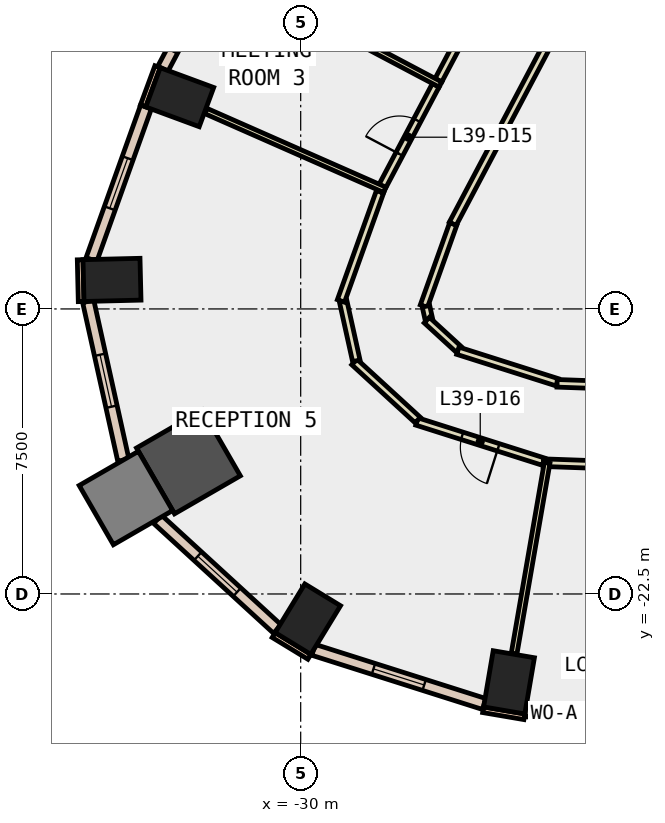
"""IFC4 building model, lengths in metres.
Left out: names, types, materials, properties, quantities, classifications, styles, units other than length and angle.
Written with IfcOpenShell. Run it as: python <this file> out.ifc"""

import sys

from ifc_helpers import new_model, si_unit, direction, frame, frame_2d, origin, origin_2d, place, context, subcontext, project, spatial, rectangle, extrude, element, fill, save


model = new_model("IFC4")
c1 = context("Model", 3, precision=1e-05, world=origin(), true_north=direction((0.0, 1.0)))
c2 = subcontext(c1, "Body", "Model", "MODEL_VIEW")
j1 = project(units=[si_unit("LENGTHUNIT", "METRE"), si_unit("PLANEANGLEUNIT", "RADIAN")], contexts=[c1])
p1 = place(None, origin())
s1 = spatial("IfcSite", under=j1, at=p1, CompositionType="ELEMENT")
p2 = place(p1, origin())
s2 = spatial("IfcBuilding", under=s1, at=p2, CompositionType="ELEMENT")
p3 = place(p2, frame((0.0, 0.0, 176.0)))
s3 = spatial("IfcBuildingStorey", under=s2, at=p3, CompositionType="ELEMENT", Elevation=176.0)
for number, where, z_axis, x_axis in (
    (1, (-24.518, -24.825, -0.4), (0.0, 0.0, 1.0), (-0.986, 0.168, 0.0)),
    (2, (-33.183, -9.429, -0.4), (0.0, 0.0, 1.0), (0.347, 0.938, 0.0)),
    (3, (-34.965, -14.236, -0.4), (0.0, 0.0, 1.0), (-0.024, 1.0, 0.0)),
):
    element("IfcColumn", number, at=place(p3, frame(where, z_axis=z_axis, x_axis=x_axis)), inside=s3, PredefinedType="COLUMN", context=c2, shape_type="SweptSolid", body=[
        extrude(rectangle(XDim=1.1, YDim=1.5, at=origin_2d()), origin(), (0.0, 0.0, 1.0), 4.2),
    ])
p4 = place(p3, frame((-32.954, -19.025, -0.4), z_axis=(0.0, 0.0, 1.0), x_axis=(0.866025403784, 0.5, 0.0)))
e4 = element("IfcColumn", 4, at=p4, inside=s3, PredefinedType="COLUMN", context=c2, shape_type="SweptSolid", body=[
    extrude(rectangle(XDim=2.0, YDim=2.0, at=origin_2d()), origin(), (0.0, 0.0, 1.0), 4.2),
])
p5 = place(p3, frame((-29.812, -23.163, -0.4), z_axis=(0.0, 0.0, 1.0), x_axis=(-0.853714435155, 0.520741455243, 0.0)))
e5 = element("IfcColumn", 5, at=p5, inside=s3, PredefinedType="COLUMN", context=c2, shape_type="SweptSolid", body=[
    extrude(rectangle(XDim=1.1, YDim=1.5, at=origin_2d()), origin(), (0.0, 0.0, 1.0), 4.2),
])
p6 = place(p3, frame((-34.599, -19.975, -0.4), z_axis=(0.0, 0.0, 1.0), x_axis=(0.866025403784, 0.5, 0.0)))
e6 = element("IfcColumn", 6, at=p6, inside=s3, PredefinedType="COLUMN", context=c2, shape_type="SweptSolid", body=[
    extrude(rectangle(XDim=1.8, YDim=1.8, at=origin_2d()), origin(), (0.0, 0.0, 1.0), 4.2),
])
p7 = place(p3, frame((-33.766, -8.627, 0.0), z_axis=(0.0, 0.0, 1.0), x_axis=(-0.346229846278, -0.938149718087, 0.0)))
e7 = element("IfcWall", 7, at=p7, inside=s3, PredefinedType="STANDARD", context=c2, shape_type="SweptSolid", body=[
    extrude(rectangle(XDim=1.1, YDim=0.15, at=frame_2d((0.55, 0.0))), origin(), (0.0, 0.0, 1.0), 3.8),
])
p8 = place(p3, frame((-25.199, -25.546, 0.0), z_axis=(0.0, 0.0, 1.0), x_axis=(0.985763338892, -0.168138751323, 0.0)))
e8 = element("IfcWall", 8, at=p8, inside=s3, PredefinedType="STANDARD", context=c2, shape_type="SweptSolid", body=[
    extrude(rectangle(XDim=1.101, YDim=0.15, at=frame_2d((0.55, 0.0))), origin(), (0.0, 0.0, 1.0), 3.8),
])
p9 = place(p3, frame((-35.803, -13.706, 0.0), z_axis=(0.0, 0.0, 1.0), x_axis=(0.023522901136, -0.999723298279, 0.0)))
e9 = element("IfcWall", 9, at=p9, inside=s3, PredefinedType="STANDARD", context=c2, shape_type="SweptSolid", body=[
    extrude(rectangle(XDim=1.1, YDim=0.15, at=frame_2d((0.55, 0.0))), origin(), (0.0, 0.0, 1.0), 3.8),
])
p10 = place(p3, frame((-30.711, -23.581, 0.0), z_axis=(0.0, 0.0, 1.0), x_axis=(0.854005542721, -0.520263907071, 0.0)))
e10 = element("IfcWall", 10, at=p10, inside=s3, PredefinedType="STANDARD", context=c2, shape_type="SweptSolid", body=[
    extrude(rectangle(XDim=1.099, YDim=0.15, at=frame_2d((0.55, 0.0))), origin(), (0.0, 0.0, 1.0), 3.8),
])
p11 = place(p3, frame((-24.09, -25.583, 0.0), z_axis=(0.0, 0.0, 1.0), x_axis=(0.999368368263, -0.035536805082, 0.0)))
e11 = element("IfcWall", 11, at=p11, inside=s3, PredefinedType="STANDARD", context=c2, shape_type="SweptSolid", body=[
    extrude(rectangle(XDim=7.317, YDim=0.3, at=frame_2d((3.658, 0.0))), origin(), (0.0, 0.0, 1.0), 3.8),
])
p12 = place(p11, frame((0.629, 0.0, 0.9)))
e12 = element("IfcOpeningElement", 12, at=p12, cuts=e11, PredefinedType="OPENING", context=c2, shape_type="SweptSolid", body=[
    extrude(rectangle(XDim=2.4, YDim=2.6, at=frame_2d((1.2, 1.3))), frame((0.0, 0.16, 0.0), z_axis=(0.0, -1.0, 0.0), x_axis=(1.0, 0.0, 0.0)), (0.0, 0.0, 1.0), 0.32),
])
p13 = place(p11, frame((4.287, 0.0, 0.9)))
e13 = element("IfcOpeningElement", 13, at=p13, cuts=e11, PredefinedType="OPENING", context=c2, shape_type="SweptSolid", body=[
    extrude(rectangle(XDim=2.4, YDim=2.6, at=frame_2d((1.2, 1.3))), frame((0.0, 0.16, 0.0), z_axis=(0.0, -1.0, 0.0), x_axis=(1.0, 0.0, 0.0)), (0.0, 0.0, 1.0), 0.32),
])
p14 = place(p3, frame((-30.765, -3.271, 0.0), z_axis=(0.0, 0.0, 1.0), x_axis=(-0.467572383403, -0.883954787463, 0.0)))
e14 = element("IfcWall", 14, at=p14, inside=s3, PredefinedType="STANDARD", context=c2, shape_type="SweptSolid", body=[
    extrude(rectangle(XDim=6.119, YDim=0.3, at=frame_2d((3.06, 0.0))), origin(), (0.0, 0.0, 1.0), 3.8),
])
p15 = place(p14, frame((0.53, 0.0, 0.9)))
e15 = element("IfcOpeningElement", 15, at=p15, cuts=e14, PredefinedType="OPENING", context=c2, shape_type="SweptSolid", body=[
    extrude(rectangle(XDim=2.0, YDim=2.6, at=frame_2d((1.0, 1.3))), frame((0.0, 0.16, 0.0), z_axis=(0.0, -1.0, 0.0), x_axis=(1.0, 0.0, 0.0)), (0.0, 0.0, 1.0), 0.32),
])
p16 = place(p14, frame((3.589, 0.0, 0.9)))
e16 = element("IfcOpeningElement", 16, at=p16, cuts=e14, PredefinedType="OPENING", context=c2, shape_type="SweptSolid", body=[
    extrude(rectangle(XDim=2.0, YDim=2.6, at=frame_2d((1.0, 1.3))), frame((0.0, 0.16, 0.0), z_axis=(0.0, -1.0, 0.0), x_axis=(1.0, 0.0, 0.0)), (0.0, 0.0, 1.0), 0.32),
])
p17 = place(p3, frame((-34.071, -9.686, 0.0), z_axis=(0.0, 0.0, 1.0), x_axis=(-0.336652028742, -0.941629126325, 0.0)))
e17 = element("IfcWall", 17, at=p17, inside=s3, PredefinedType="STANDARD", context=c2, shape_type="SweptSolid", body=[
    extrude(rectangle(XDim=4.263, YDim=0.3, at=frame_2d((2.131, 0.0))), origin(), (0.0, 0.0, 1.0), 3.8),
])
p18 = place(p17, frame((1.431, 0.0, 0.9)))
e18 = element("IfcOpeningElement", 18, at=p18, cuts=e17, PredefinedType="OPENING", context=c2, shape_type="SweptSolid", body=[
    extrude(rectangle(XDim=1.4, YDim=2.6, at=frame_2d((0.7, 1.3))), frame((0.0, 0.16, 0.0), z_axis=(0.0, -1.0, 0.0), x_axis=(1.0, 0.0, 0.0)), (0.0, 0.0, 1.0), 0.32),
])
p19 = place(p3, frame((-35.591, -14.801, 0.0), z_axis=(0.0, 0.0, 1.0), x_axis=(0.216102175589, -0.976370754225, 0.0)))
e19 = element("IfcWall", 19, at=p19, inside=s3, PredefinedType="STANDARD", context=c2, shape_type="SweptSolid", body=[
    extrude(rectangle(XDim=4.276, YDim=0.3, at=frame_2d((2.138, 0.0))), origin(), (0.0, 0.0, 1.0), 3.8),
])
p20 = place(p19, frame((1.438, 0.0, 0.9)))
e20 = element("IfcOpeningElement", 20, at=p20, cuts=e19, PredefinedType="OPENING", context=c2, shape_type="SweptSolid", body=[
    extrude(rectangle(XDim=1.4, YDim=2.6, at=frame_2d((0.7, 1.3))), frame((0.0, 0.16, 0.0), z_axis=(0.0, -1.0, 0.0), x_axis=(1.0, 0.0, 0.0)), (0.0, 0.0, 1.0), 0.32),
])
p21 = place(p3, frame((-33.768, -20.533, 0.0), z_axis=(0.0, 0.0, 1.0), x_axis=(0.737279680174, -0.675587650274, 0.0)))
e21 = element("IfcWall", 21, at=p21, inside=s3, PredefinedType="STANDARD", context=c2, shape_type="SweptSolid", body=[
    extrude(rectangle(XDim=4.278, YDim=0.3, at=frame_2d((2.139, 0.0))), origin(), (0.0, 0.0, 1.0), 3.8),
])
p22 = place(p21, frame((1.439, 0.0, 0.9)))
e22 = element("IfcOpeningElement", 22, at=p22, cuts=e21, PredefinedType="OPENING", context=c2, shape_type="SweptSolid", body=[
    extrude(rectangle(XDim=1.4, YDim=2.6, at=frame_2d((0.7, 1.3))), frame((0.0, 0.16, 0.0), z_axis=(0.0, -1.0, 0.0), x_axis=(1.0, 0.0, 0.0)), (0.0, 0.0, 1.0), 0.32),
])
p23 = place(p3, frame((-29.662, -23.97, 0.0), z_axis=(0.0, 0.0, 1.0), x_axis=(0.953145379857, -0.302512619337, 0.0)))
e23 = element("IfcWall", 23, at=p23, inside=s3, PredefinedType="STANDARD", context=c2, shape_type="SweptSolid", body=[
    extrude(rectangle(XDim=4.711, YDim=0.3, at=frame_2d((2.355, 0.0))), origin(), (0.0, 0.0, 1.0), 3.8),
])
p24 = place(p23, frame((1.655, 0.0, 0.9)))
e24 = element("IfcOpeningElement", 24, at=p24, cuts=e23, PredefinedType="OPENING", context=c2, shape_type="SweptSolid", body=[
    extrude(rectangle(XDim=1.4, YDim=2.6, at=frame_2d((0.7, 1.3))), frame((0.0, 0.16, 0.0), z_axis=(0.0, -1.0, 0.0), x_axis=(1.0, 0.0, 0.0)), (0.0, 0.0, 1.0), 0.32),
])
p25 = place(p3, frame((-22.888, -6.878, 0.0), z_axis=(0.0, 0.0, 1.0), x_axis=(-0.467533790284, -0.883975200411, 0.0)))
e25 = element("IfcWall", 25, at=p25, inside=s3, PredefinedType="PARTITIONING", context=c2, shape_type="SweptSolid", body=[
    extrude(rectangle(XDim=6.656, YDim=0.2, at=frame_2d((3.328, 0.0))), origin(), (0.0, 0.0, 1.0), 3.75),
])
p26 = place(p3, frame((-25.987, -12.768, 0.0), z_axis=(0.0, 0.0, 1.0), x_axis=(-0.33645112914, -0.941700927949, 0.0)))
e26 = element("IfcWall", 26, at=p26, inside=s3, PredefinedType="PARTITIONING", context=c2, shape_type="SweptSolid", body=[
    extrude(rectangle(XDim=2.292, YDim=0.2, at=frame_2d((1.146, 0.0))), origin(), (0.0, 0.0, 1.0), 3.75),
])
p27 = place(p3, frame((-26.703, -14.93, 0.0), z_axis=(0.0, 0.0, 1.0), x_axis=(0.216250293589, -0.976337959173, 0.0)))
e27 = element("IfcWall", 27, at=p27, inside=s3, PredefinedType="PARTITIONING", context=c2, shape_type="SweptSolid", body=[
    extrude(rectangle(XDim=0.342, YDim=0.2, at=frame_2d((0.171, 0.0))), origin(), (0.0, 0.0, 1.0), 3.75),
])
p28 = place(p3, frame((-26.681, -15.294, 0.0), z_axis=(0.0, 0.0, 1.0), x_axis=(0.737118519418, -0.675763485497, 0.0)))
e28 = element("IfcWall", 28, at=p28, inside=s3, PredefinedType="PARTITIONING", context=c2, shape_type="SweptSolid", body=[
    extrude(rectangle(XDim=1.138, YDim=0.2, at=frame_2d((0.569, 0.0))), origin(), (0.0, 0.0, 1.0), 3.75),
])
p29 = place(p3, frame((-25.864, -16.1, 0.0), z_axis=(0.0, 0.0, 1.0), x_axis=(0.953158072423, -0.302472625167, 0.0)))
e29 = element("IfcWall", 29, at=p29, inside=s3, PredefinedType="PARTITIONING", context=c2, shape_type="SweptSolid", body=[
    extrude(rectangle(XDim=2.743, YDim=0.2, at=frame_2d((1.372, 0.0))), origin(), (0.0, 0.0, 1.0), 3.75),
])
p30 = place(p3, frame((-23.253, -16.957, 0.0), z_axis=(0.0, 0.0, 1.0), x_axis=(0.999365460355, -0.035618487468, 0.0)))
e30 = element("IfcWall", 30, at=p30, inside=s3, PredefinedType="PARTITIONING", context=c2, shape_type="SweptSolid", body=[
    extrude(rectangle(XDim=7.272, YDim=0.2, at=frame_2d((3.636, 0.0))), origin(), (0.0, 0.0, 1.0), 3.75),
])
p31 = place(p3, frame((-26.376, -8.982, 0.0), z_axis=(0.0, 0.0, 1.0), x_axis=(0.467529077139, 0.883977693174, 0.0)))
e31 = element("IfcWall", 31, at=p31, inside=s3, PredefinedType="PARTITIONING", context=c2, shape_type="SweptSolid", body=[
    extrude(rectangle(XDim=3.503, YDim=0.2, at=frame_2d((1.752, 0.0))), origin(), (0.0, 0.0, 1.0), 3.75),
])
p32 = place(p3, frame((-27.891, -11.847, 0.0), z_axis=(0.0, 0.0, 1.0), x_axis=(0.467571923705, 0.883955030623, 0.0)))
e32 = element("IfcWall", 32, at=p32, inside=s3, PredefinedType="PARTITIONING", context=c2, shape_type="SweptSolid", body=[
    extrude(rectangle(XDim=3.091, YDim=0.2, at=frame_2d((1.545, 0.0))), origin(), (0.0, 0.0, 1.0), 3.75),
])
p33 = place(p32, frame((1.045, 0.0, 0.0)))
e33 = element("IfcOpeningElement", 33, at=p33, cuts=e32, PredefinedType="OPENING", context=c2, shape_type="SweptSolid", body=[
    extrude(rectangle(XDim=1.0, YDim=2.1, at=frame_2d((0.5, 1.05))), frame((0.0, 0.11, 0.0), z_axis=(0.0, -1.0, 0.0), x_axis=(1.0, 0.0, 0.0)), (0.0, 0.0, 1.0), 0.22),
])
p34 = place(p3, frame((-23.61, -19.019, 0.0), z_axis=(0.0, 0.0, 1.0), x_axis=(-0.953121068097, 0.302589209243, 0.0)))
e34 = element("IfcWall", 34, at=p34, inside=s3, PredefinedType="PARTITIONING", context=c2, shape_type="SweptSolid", body=[
    extrude(rectangle(XDim=3.494, YDim=0.2, at=frame_2d((1.747, 0.0))), origin(), (0.0, 0.0, 1.0), 3.75),
])
p35 = place(p34, frame((1.247, 0.0, 0.0)))
e35 = element("IfcOpeningElement", 35, at=p35, cuts=e34, PredefinedType="OPENING", context=c2, shape_type="SweptSolid", body=[
    extrude(rectangle(XDim=1.0, YDim=2.1, at=frame_2d((0.5, 1.05))), frame((0.0, 0.11, 0.0), z_axis=(0.0, -1.0, 0.0), x_axis=(1.0, 0.0, 0.0)), (0.0, 0.0, 1.0), 0.22),
])
p36 = place(p3, frame((-26.919, -17.925, 0.0), z_axis=(0.0, 0.0, 1.0), x_axis=(-0.737118331834, 0.675763690112, 0.0)))
e36 = element("IfcWall", 36, at=p36, inside=s3, PredefinedType="PARTITIONING", context=c2, shape_type="SweptSolid", body=[
    extrude(rectangle(XDim=2.264, YDim=0.2, at=frame_2d((1.132, 0.0))), origin(), (0.0, 0.0, 1.0), 3.75),
])
p37 = place(p3, frame((-28.536, -16.365, 0.0), z_axis=(0.0, 0.0, 1.0), x_axis=(-0.216223984898, 0.976343785946, 0.0)))
e37 = element("IfcWall", 37, at=p37, inside=s3, PredefinedType="PARTITIONING", context=c2, shape_type="SweptSolid", body=[
    extrude(rectangle(XDim=1.61, YDim=0.2, at=frame_2d((0.805, 0.0))), origin(), (0.0, 0.0, 1.0), 3.75),
])
p38 = place(p3, frame((-28.94, -14.789, 0.0), z_axis=(0.0, 0.0, 1.0), x_axis=(0.336864004528, 0.941553313654, 0.0)))
e38 = element("IfcWall", 38, at=p38, inside=s3, PredefinedType="PARTITIONING", context=c2, shape_type="SweptSolid", body=[
    extrude(rectangle(XDim=3.048, YDim=0.2, at=frame_2d((1.524, 0.0))), origin(), (0.0, 0.0, 1.0), 3.75),
])
p39 = place(p3, frame((-16.045, -19.316, 0.0), z_axis=(0.0, 0.0, 1.0), x_axis=(-0.999359853626, 0.035775451915, 0.0)))
e39 = element("IfcWall", 39, at=p39, inside=s3, PredefinedType="PARTITIONING", context=c2, shape_type="SweptSolid", body=[
    extrude(rectangle(XDim=7.575, YDim=0.2, at=frame_2d((3.788, 0.0))), origin(), (0.0, 0.0, 1.0), 3.75),
])
p40 = place(p39, frame((3.288, 0.0, 0.0)))
e40 = element("IfcOpeningElement", 40, at=p40, cuts=e39, PredefinedType="OPENING", context=c2, shape_type="SweptSolid", body=[
    extrude(rectangle(XDim=1.0, YDim=2.1, at=frame_2d((0.5, 1.05))), frame((0.0, 0.11, 0.0), z_axis=(0.0, -1.0, 0.0), x_axis=(1.0, 0.0, 0.0)), (0.0, 0.0, 1.0), 0.22),
])
p41 = place(p3, frame((-26.323, -9.095, 0.0), z_axis=(0.0, 0.0, 1.0), x_axis=(-0.883977869384, 0.467528743971, 0.0)))
e41 = element("IfcWall", 41, at=p41, inside=s3, PredefinedType="PARTITIONING", context=c2, shape_type="SweptSolid", body=[
    extrude(rectangle(XDim=6.5, YDim=0.15, at=frame_2d((3.25, 0.0))), origin(), (0.0, 0.0, 1.0), 3.75),
])
p42 = place(p3, frame((-27.788, -11.865, 0.0), z_axis=(0.0, 0.0, 1.0), x_axis=(-0.915139307711, 0.403137752489, 0.0)))
e42 = element("IfcWall", 42, at=p42, inside=s3, PredefinedType="PARTITIONING", context=c2, shape_type="SweptSolid", body=[
    extrude(rectangle(XDim=5.145, YDim=0.15, at=frame_2d((2.572, 0.0))), origin(), (0.0, 0.0, 1.0), 3.75),
])
p43 = place(p3, frame((-23.515, -19.049, 0.0), z_axis=(0.0, 0.0, 1.0), x_axis=(-0.170669435204, -0.985328343187, 0.0)))
e43 = element("IfcWall", 43, at=p43, inside=s3, PredefinedType="PARTITIONING", context=c2, shape_type="SweptSolid", body=[
    extrude(rectangle(XDim=5.093, YDim=0.15, at=frame_2d((2.546, 0.0))), origin(), (0.0, 0.0, 1.0), 3.75),
])
p44 = place(p12, origin())
e44 = element("IfcWindow", 44, at=p44, inside=s3, PartitioningType="SINGLE_PANEL", PredefinedType="WINDOW", context=c2, shape_type="SweptSolid", body=[
    extrude(rectangle(XDim=2.4, YDim=2.6, at=frame_2d((1.2, 1.3))), frame((0.0, 0.03, 0.0), z_axis=(0.0, -1.0, 0.0), x_axis=(1.0, 0.0, 0.0)), (0.0, 0.0, 1.0), 0.06),
])
fill(e12, e44)
p45 = place(p18, origin())
e45 = element("IfcWindow", 45, at=p45, inside=s3, PartitioningType="SINGLE_PANEL", PredefinedType="WINDOW", context=c2, shape_type="SweptSolid", body=[
    extrude(rectangle(XDim=1.4, YDim=2.6, at=frame_2d((0.7, 1.3))), frame((0.0, 0.03, 0.0), z_axis=(0.0, -1.0, 0.0), x_axis=(1.0, 0.0, 0.0)), (0.0, 0.0, 1.0), 0.06),
])
fill(e18, e45)
p46 = place(p20, origin())
e46 = element("IfcWindow", 46, at=p46, inside=s3, PartitioningType="SINGLE_PANEL", PredefinedType="WINDOW", context=c2, shape_type="SweptSolid", body=[
    extrude(rectangle(XDim=1.4, YDim=2.6, at=frame_2d((0.7, 1.3))), frame((0.0, 0.03, 0.0), z_axis=(0.0, -1.0, 0.0), x_axis=(1.0, 0.0, 0.0)), (0.0, 0.0, 1.0), 0.06),
])
fill(e20, e46)
p47 = place(p22, origin())
e47 = element("IfcWindow", 47, at=p47, inside=s3, PartitioningType="SINGLE_PANEL", PredefinedType="WINDOW", context=c2, shape_type="SweptSolid", body=[
    extrude(rectangle(XDim=1.4, YDim=2.6, at=frame_2d((0.7, 1.3))), frame((0.0, 0.03, 0.0), z_axis=(0.0, -1.0, 0.0), x_axis=(1.0, 0.0, 0.0)), (0.0, 0.0, 1.0), 0.06),
])
fill(e22, e47)
p48 = place(p24, origin())
e48 = element("IfcWindow", 48, at=p48, inside=s3, PartitioningType="SINGLE_PANEL", PredefinedType="WINDOW", context=c2, shape_type="SweptSolid", body=[
    extrude(rectangle(XDim=1.4, YDim=2.6, at=frame_2d((0.7, 1.3))), frame((0.0, 0.03, 0.0), z_axis=(0.0, -1.0, 0.0), x_axis=(1.0, 0.0, 0.0)), (0.0, 0.0, 1.0), 0.06),
])
fill(e24, e48)
p49 = place(p33, origin())
e49 = element("IfcDoor", 49, at=p49, inside=s3, OperationType="SINGLE_SWING_LEFT", PredefinedType="DOOR", context=c2, shape_type="SweptSolid", body=[
    extrude(rectangle(XDim=1.0, YDim=2.1, at=frame_2d((0.5, 1.05))), frame((0.0, 0.025, 0.0), z_axis=(0.0, -1.0, 0.0), x_axis=(1.0, 0.0, 0.0)), (0.0, 0.0, 1.0), 0.05),
])
fill(e33, e49)
p50 = place(p35, origin())
e50 = element("IfcDoor", 50, at=p50, inside=s3, OperationType="SINGLE_SWING_LEFT", PredefinedType="DOOR", context=c2, shape_type="SweptSolid", body=[
    extrude(rectangle(XDim=1.0, YDim=2.1, at=frame_2d((0.5, 1.05))), frame((0.0, 0.025, 0.0), z_axis=(0.0, -1.0, 0.0), x_axis=(1.0, 0.0, 0.0)), (0.0, 0.0, 1.0), 0.05),
])
fill(e35, e50)
save(model, sys.argv[1])
